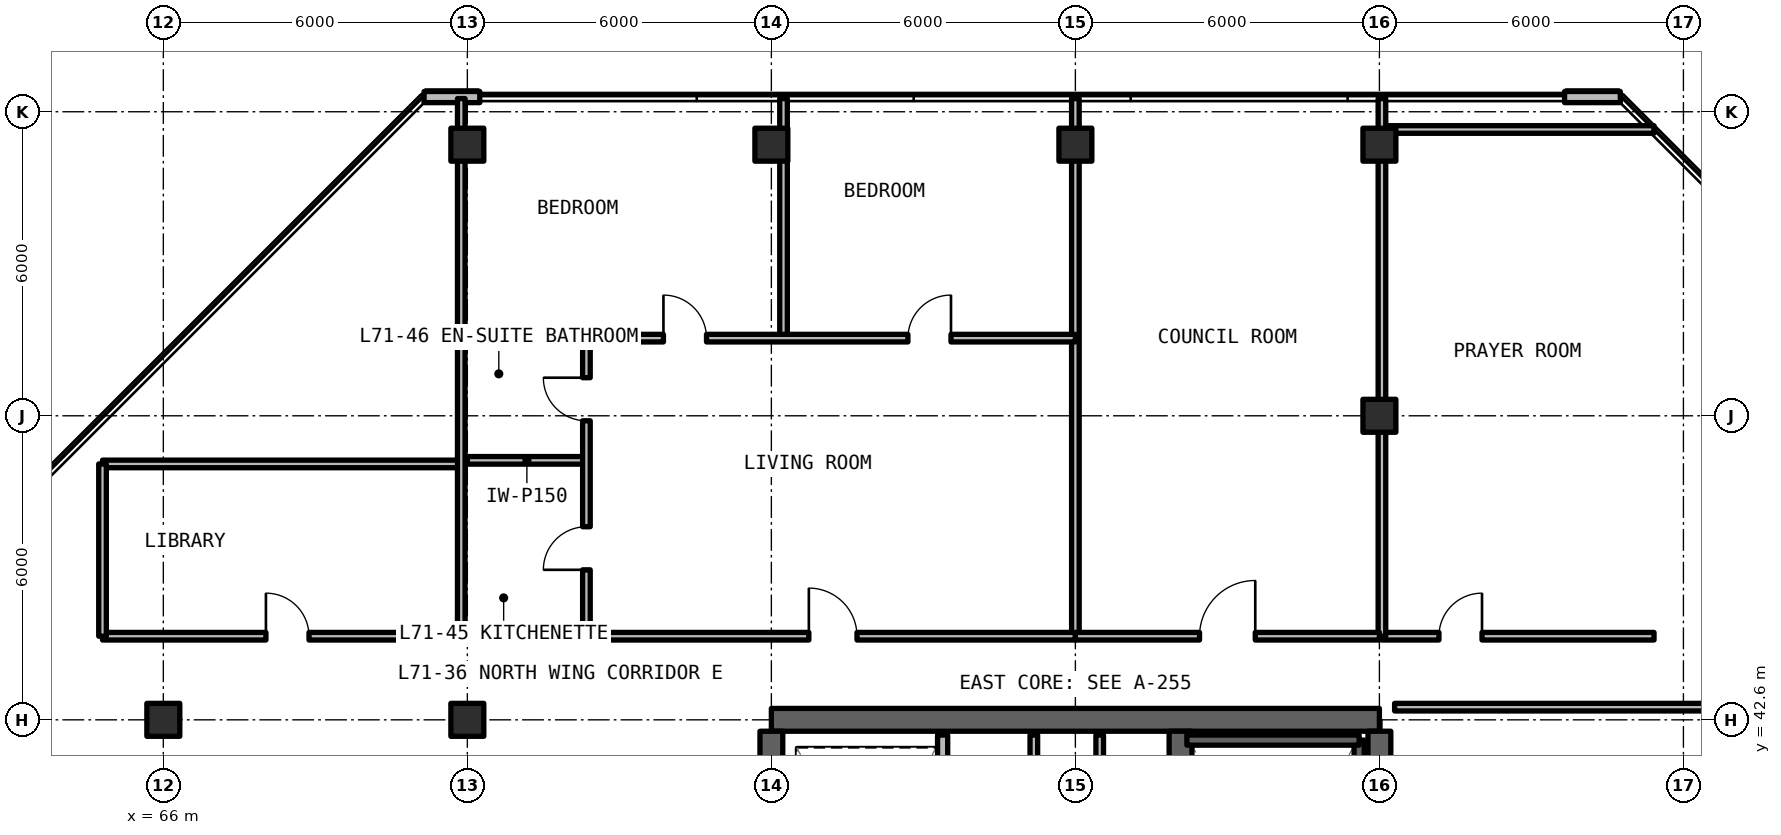
"""IFC4 building model, lengths in metres.
Left out: names, types, materials, properties, quantities, classifications, styles, units other than length and angle.
Written with IfcOpenShell. Run it as: python <this file> out.ifc"""

import sys

from ifc_helpers import new_model, si_unit, direction, frame, frame_2d, origin, origin_2d, place, context, subcontext, project, spatial, rectangle, extrude, element, fill, save


model = new_model("IFC4")
c1 = context("Model", 3, precision=1e-05, world=origin(), true_north=direction((0.0, 1.0)))
c2 = subcontext(c1, "Body", "Model", "MODEL_VIEW")
j1 = project(units=[si_unit("LENGTHUNIT", "METRE"), si_unit("PLANEANGLEUNIT", "RADIAN")], contexts=[c1])
p1 = place(None, origin())
s1 = spatial("IfcSite", under=j1, at=p1, CompositionType="ELEMENT")
p2 = place(p1, origin())
s2 = spatial("IfcBuilding", under=s1, at=p2, CompositionType="ELEMENT")
p3 = place(p2, frame((0.0, 0.0, 253.44)))
s3 = spatial("IfcBuildingStorey", under=s2, at=p3, CompositionType="ELEMENT", Elevation=253.44)
p4 = place(p3, frame((90.0, 42.6, 0.0), z_axis=(0.0, 0.0, 1.0), x_axis=(-1.0, 0.0, 0.0)))
e1 = element("IfcWall", 1, at=p4, inside=s3, PredefinedType="SHEAR", context=c2, shape_type="SweptSolid", body=[
    extrude(rectangle(XDim=12.0, YDim=0.45, at=frame_2d((6.0, 0.0))), origin(), (0.0, 0.0, 1.0), 3.63),
])
p5 = place(p3, frame((90.0, 24.825, 0.0), z_axis=(0.0, 0.0, 1.0), x_axis=(0.0, 1.0, 0.0)))
e2 = element("IfcWall", 2, at=p5, inside=s3, PredefinedType="SHEAR", context=c2, shape_type="SweptSolid", body=[
    extrude(rectangle(XDim=17.55, YDim=0.45, at=frame_2d((8.775, 0.0))), origin(), (0.0, 0.0, 1.0), 3.63),
])
p6 = place(p3, frame((78.0, 36.8, 0.0), z_axis=(0.0, 0.0, 1.0), x_axis=(0.0, 1.0, 0.0)))
e3 = element("IfcWall", 3, at=p6, inside=s3, PredefinedType="SHEAR", context=c2, shape_type="SweptSolid", body=[
    extrude(rectangle(XDim=5.575, YDim=0.45, at=frame_2d((2.788, 0.0))), origin(), (0.0, 0.0, 1.0), 3.63),
])
p7 = place(p3, frame((86.075, 24.825, 0.0), z_axis=(0.0, 0.0, 1.0), x_axis=(0.0, 1.0, 0.0)))
e4 = element("IfcWall", 4, at=p7, inside=s3, PredefinedType="SHEAR", context=c2, shape_type="SweptSolid", body=[
    extrude(rectangle(XDim=17.55, YDim=0.45, at=frame_2d((8.775, 0.0))), origin(), (0.0, 0.0, 1.0), 3.63),
])
p8 = place(p7, frame((0.425, 0.0, 0.0)))
e5 = element("IfcOpeningElement", 5, at=p8, cuts=e4, PredefinedType="OPENING", context=c2, shape_type="SweptSolid", body=[
    extrude(rectangle(XDim=1.15, YDim=2.15, at=frame_2d((0.575, 1.075))), frame((0.0, 0.235, 0.0), z_axis=(0.0, -1.0, 0.0), x_axis=(1.0, 0.0, 0.0)), (0.0, 0.0, 1.0), 0.47),
])
p9 = place(p7, frame((9.625, 0.0, 0.0)))
e6 = element("IfcOpeningElement", 6, at=p9, cuts=e4, PredefinedType="OPENING", context=c2, shape_type="SweptSolid", body=[
    extrude(rectangle(XDim=1.15, YDim=2.15, at=frame_2d((0.575, 1.075))), frame((0.0, 0.235, 0.0), z_axis=(0.0, -1.0, 0.0), x_axis=(1.0, 0.0, 0.0)), (0.0, 0.0, 1.0), 0.47),
])
for number, where, z_axis, x_axis in (
    (7, (66.0, 42.6, 0.0), (0.0, 0.0, 1.0), (1.0, 0.0, 0.0)),
    (8, (72.0, 42.6, 0.0), (0.0, 0.0, 1.0), (1.0, 0.0, 0.0)),
    (9, (90.0, 48.6, 0.0), (0.0, 0.0, 1.0), (1.0, 0.0, 0.0)),
    (10, (72.0, 53.95, 0.0), (0.0, 0.0, 1.0), (1.0, 0.0, 0.0)),
    (11, (78.0, 53.95, 0.0), (0.0, 0.0, 1.0), (1.0, 0.0, 0.0)),
    (12, (84.0, 53.95, 0.0), (0.0, 0.0, 1.0), (1.0, 0.0, 0.0)),
    (13, (90.0, 53.95, 0.0), (0.0, 0.0, 1.0), (1.0, 0.0, 0.0)),
):
    element("IfcColumn", number, at=place(p3, frame(where, z_axis=z_axis, x_axis=x_axis)), inside=s3, PredefinedType="COLUMN", context=c2, shape_type="SweptSolid", body=[
        extrude(rectangle(XDim=0.65, YDim=0.65, at=origin_2d()), origin(), (0.0, 0.0, 1.0), 3.63),
    ])
for number, where, z_axis, x_axis in (
    (14, (94.754, 54.89, 0.0), (0.0, 0.0, 1.0), (-1.0, 0.0, 0.0)),
    (15, (72.246, 54.89, 0.0), (0.0, 0.0, 1.0), (-1.0, 0.0, 0.0)),
):
    element("IfcWall", number, at=place(p3, frame(where, z_axis=z_axis, x_axis=x_axis)), inside=s3, PredefinedType="SOLIDWALL", context=c2, shape_type="SweptSolid", body=[
        extrude(rectangle(XDim=1.1, YDim=0.22, at=frame_2d((0.55, 0.0))), origin(), (0.0, 0.0, 1.0), 3.41),
    ])
p10 = place(p3, frame((84.48, 36.88, 0.0), z_axis=(0.0, 0.0, 1.0), x_axis=(0.0, 1.0, 0.0)))
e16 = element("IfcWall", 16, at=p10, inside=s3, PredefinedType="SOLIDWALL", context=c2, shape_type="SweptSolid", body=[
    extrude(rectangle(XDim=5.42, YDim=0.15, at=frame_2d((2.71, 0.0))), origin(), (0.0, 0.0, 1.0), 2.63),
])
p11 = place(p3, frame((83.18, 36.88, 0.0), z_axis=(0.0, 0.0, 1.0), x_axis=(0.0, 1.0, 0.0)))
e17 = element("IfcWall", 17, at=p11, inside=s3, PredefinedType="SOLIDWALL", context=c2, shape_type="SweptSolid", body=[
    extrude(rectangle(XDim=5.42, YDim=0.15, at=frame_2d((2.71, 0.0))), origin(), (0.0, 0.0, 1.0), 2.63),
])
p12 = place(p11, frame((2.1, 0.0, 0.0)))
e18 = element("IfcOpeningElement", 18, at=p12, cuts=e17, PredefinedType="OPENING", context=c2, shape_type="SweptSolid", body=[
    extrude(rectangle(XDim=0.95, YDim=2.15, at=frame_2d((0.475, 1.075))), frame((0.0, 0.085, 0.0), z_axis=(0.0, -1.0, 0.0), x_axis=(1.0, 0.0, 0.0)), (0.0, 0.0, 1.0), 0.17),
])
p13 = place(p3, frame((81.38, 36.88, 0.0), z_axis=(0.0, 0.0, 1.0), x_axis=(0.0, 1.0, 0.0)))
e19 = element("IfcWall", 19, at=p13, inside=s3, PredefinedType="SOLIDWALL", context=c2, shape_type="SweptSolid", body=[
    extrude(rectangle(XDim=5.42, YDim=0.2, at=frame_2d((2.71, 0.0))), origin(), (0.0, 0.0, 1.0), 2.63),
])
p14 = place(p13, frame((0.8, 0.0, 0.0)))
e20 = element("IfcOpeningElement", 20, at=p14, cuts=e19, PredefinedType="OPENING", context=c2, shape_type="SweptSolid", body=[
    extrude(rectangle(XDim=1.1, YDim=2.2, at=frame_2d((0.55, 1.1))), frame((0.0, 0.11, 0.0), z_axis=(0.0, -1.0, 0.0), x_axis=(1.0, 0.0, 0.0)), (0.0, 0.0, 1.0), 0.22),
])
p15 = place(p13, frame((3.3, 0.0, 0.0)))
e21 = element("IfcOpeningElement", 21, at=p15, cuts=e19, PredefinedType="OPENING", context=c2, shape_type="SweptSolid", body=[
    extrude(rectangle(XDim=1.1, YDim=2.2, at=frame_2d((0.55, 1.1))), frame((0.0, 0.11, 0.0), z_axis=(0.0, -1.0, 0.0), x_axis=(1.0, 0.0, 0.0)), (0.0, 0.0, 1.0), 0.22),
])
p16 = place(p3, frame((64.8, 44.25, 0.0), z_axis=(0.0, 0.0, 1.0), x_axis=(1.0, 0.0, 0.0)))
e22 = element("IfcWall", 22, at=p16, inside=s3, PredefinedType="SOLIDWALL", context=c2, shape_type="SweptSolid", body=[
    extrude(rectangle(XDim=7.08, YDim=0.15, at=frame_2d((3.54, 0.0))), origin(), (0.0, 0.0, 1.0), 2.63),
])
p17 = place(p16, frame((3.225, 0.0, 0.0)))
e23 = element("IfcOpeningElement", 23, at=p17, cuts=e22, PredefinedType="OPENING", context=c2, shape_type="SweptSolid", body=[
    extrude(rectangle(XDim=0.85, YDim=2.1, at=frame_2d((0.425, 1.05))), frame((0.0, 0.085, 0.0), z_axis=(0.0, -1.0, 0.0), x_axis=(1.0, 0.0, 0.0)), (0.0, 0.0, 1.0), 0.17),
])
p18 = place(p3, frame((64.8, 47.65, 0.0), z_axis=(0.0, 0.0, 1.0), x_axis=(1.0, 0.0, 0.0)))
e24 = element("IfcWall", 24, at=p18, inside=s3, PredefinedType="SOLIDWALL", context=c2, shape_type="SweptSolid", body=[
    extrude(rectangle(XDim=7.08, YDim=0.15, at=frame_2d((3.54, 0.0))), origin(), (0.0, 0.0, 1.0), 2.63),
])
p19 = place(p3, frame((64.8, 44.25, 0.0), z_axis=(0.0, 0.0, 1.0), x_axis=(0.0, 1.0, 0.0)))
e25 = element("IfcWall", 25, at=p19, inside=s3, PredefinedType="SOLIDWALL", context=c2, shape_type="SweptSolid", body=[
    extrude(rectangle(XDim=3.4, YDim=0.15, at=frame_2d((1.7, 0.0))), origin(), (0.0, 0.0, 1.0), 2.63),
])
p20 = place(p3, frame((71.88, 44.25, 0.0), z_axis=(0.0, 0.0, 1.0), x_axis=(0.0, 1.0, 0.0)))
e26 = element("IfcWall", 26, at=p20, inside=s3, PredefinedType="SOLIDWALL", context=c2, shape_type="SweptSolid", body=[
    extrude(rectangle(XDim=10.61, YDim=0.15, at=frame_2d((5.305, 0.0))), origin(), (0.0, 0.0, 1.0), 2.63),
])
p21 = place(p3, frame((90.3, 42.85, 0.0), z_axis=(0.0, 0.0, 1.0), x_axis=(1.0, 0.0, 0.0)))
e27 = element("IfcWall", 27, at=p21, inside=s3, PredefinedType="SOLIDWALL", context=c2, shape_type="SweptSolid", body=[
    extrude(rectangle(XDim=8.52, YDim=0.15, at=frame_2d((4.26, 0.0))), origin(), (0.0, 0.0, 1.0), 2.63),
])
p22 = place(p3, frame((90.05, 44.25, 0.0), z_axis=(0.0, 0.0, 1.0), x_axis=(1.0, 0.0, 0.0)))
e28 = element("IfcWall", 28, at=p22, inside=s3, PredefinedType="SOLIDWALL", context=c2, shape_type="SweptSolid", body=[
    extrude(rectangle(XDim=5.37, YDim=0.15, at=frame_2d((2.685, 0.0))), origin(), (0.0, 0.0, 1.0), 2.63),
])
p23 = place(p22, frame((1.125, 0.0, 0.0)))
e29 = element("IfcOpeningElement", 29, at=p23, cuts=e28, PredefinedType="OPENING", context=c2, shape_type="SweptSolid", body=[
    extrude(rectangle(XDim=0.85, YDim=2.1, at=frame_2d((0.425, 1.05))), frame((0.0, 0.085, 0.0), z_axis=(0.0, -1.0, 0.0), x_axis=(1.0, 0.0, 0.0)), (0.0, 0.0, 1.0), 0.17),
])
p24 = place(p3, frame((90.05, 54.25, 0.0), z_axis=(0.0, 0.0, 1.0), x_axis=(1.0, 0.0, 0.0)))
e30 = element("IfcWall", 30, at=p24, inside=s3, PredefinedType="SOLIDWALL", context=c2, shape_type="SweptSolid", body=[
    extrude(rectangle(XDim=5.37, YDim=0.15, at=frame_2d((2.685, 0.0))), origin(), (0.0, 0.0, 1.0), 2.63),
])
for number, where, z_axis, x_axis in (
    (31, (90.05, 44.25, 0.0), (0.0, 0.0, 1.0), (0.0, 1.0, 0.0)),
    (32, (84.0, 44.25, 0.0), (0.0, 0.0, 1.0), (0.0, 1.0, 0.0)),
):
    element("IfcWall", number, at=place(p3, frame(where, z_axis=z_axis, x_axis=x_axis)), inside=s3, PredefinedType="SOLIDWALL", context=c2, shape_type="SweptSolid", body=[
        extrude(rectangle(XDim=10.61, YDim=0.15, at=frame_2d((5.305, 0.0))), origin(), (0.0, 0.0, 1.0), 2.63),
    ])
p25 = place(p3, frame((72.0, 47.721, 0.0), z_axis=(0.0, 0.0, 1.0), x_axis=(1.0, 0.0, 0.0)))
e33 = element("IfcWall", 33, at=p25, inside=s3, PredefinedType="PARTITIONING", context=c2, shape_type="SweptSolid", body=[
    extrude(rectangle(XDim=2.35, YDim=0.15, at=frame_2d((1.175, 0.0))), origin(), (0.0, 0.0, 1.0), 2.63),
])
p26 = place(p3, frame((74.35, 44.25, 0.0), z_axis=(0.0, 0.0, 1.0), x_axis=(0.0, 1.0, 0.0)))
e34 = element("IfcWall", 34, at=p26, inside=s3, PredefinedType="PARTITIONING", context=c2, shape_type="SweptSolid", body=[
    extrude(rectangle(XDim=5.882, YDim=0.15, at=frame_2d((2.941, 0.0))), origin(), (0.0, 0.0, 1.0), 2.63),
])
p27 = place(p26, frame((1.31, 0.0, 0.0)))
e35 = element("IfcOpeningElement", 35, at=p27, cuts=e34, PredefinedType="OPENING", context=c2, shape_type="SweptSolid", body=[
    extrude(rectangle(XDim=0.85, YDim=2.1, at=frame_2d((0.425, 1.05))), frame((0.0, 0.085, 0.0), z_axis=(0.0, -1.0, 0.0), x_axis=(1.0, 0.0, 0.0)), (0.0, 0.0, 1.0), 0.17),
])
p28 = place(p26, frame((4.251, 0.0, 0.0)))
e36 = element("IfcOpeningElement", 36, at=p28, cuts=e34, PredefinedType="OPENING", context=c2, shape_type="SweptSolid", body=[
    extrude(rectangle(XDim=0.85, YDim=2.1, at=frame_2d((0.425, 1.05))), frame((0.0, 0.085, 0.0), z_axis=(0.0, -1.0, 0.0), x_axis=(1.0, 0.0, 0.0)), (0.0, 0.0, 1.0), 0.17),
])
p29 = place(p3, frame((78.24, 50.132, 0.0), z_axis=(0.0, 0.0, 1.0), x_axis=(0.0, 1.0, 0.0)))
e37 = element("IfcWall", 37, at=p29, inside=s3, PredefinedType="PARTITIONING", context=c2, shape_type="SweptSolid", body=[
    extrude(rectangle(XDim=4.728, YDim=0.15, at=frame_2d((2.364, 0.0))), origin(), (0.0, 0.0, 1.0), 2.63),
])
p30 = place(p3, frame((72.0, 50.132, 0.0), z_axis=(0.0, 0.0, 1.0), x_axis=(1.0, 0.0, 0.0)))
e38 = element("IfcWall", 38, at=p30, inside=s3, PredefinedType="PARTITIONING", context=c2, shape_type="SweptSolid", body=[
    extrude(rectangle(XDim=12.0, YDim=0.15, at=frame_2d((6.0, 0.0))), origin(), (0.0, 0.0, 1.0), 2.63),
])
p31 = place(p30, frame((3.87, 0.0, 0.0)))
e39 = element("IfcOpeningElement", 39, at=p31, cuts=e38, PredefinedType="OPENING", context=c2, shape_type="SweptSolid", body=[
    extrude(rectangle(XDim=0.85, YDim=2.1, at=frame_2d((0.425, 1.05))), frame((0.0, 0.085, 0.0), z_axis=(0.0, -1.0, 0.0), x_axis=(1.0, 0.0, 0.0)), (0.0, 0.0, 1.0), 0.17),
])
p32 = place(p30, frame((8.695, 0.0, 0.0)))
e40 = element("IfcOpeningElement", 40, at=p32, cuts=e38, PredefinedType="OPENING", context=c2, shape_type="SweptSolid", body=[
    extrude(rectangle(XDim=0.85, YDim=2.1, at=frame_2d((0.425, 1.05))), frame((0.0, 0.085, 0.0), z_axis=(0.0, -1.0, 0.0), x_axis=(1.0, 0.0, 0.0)), (0.0, 0.0, 1.0), 0.17),
])
p33 = place(p3, frame((72.0, 44.25, 0.0), z_axis=(0.0, 0.0, 1.0), x_axis=(1.0, 0.0, 0.0)))
e41 = element("IfcWall", 41, at=p33, inside=s3, PredefinedType="SOLIDWALL", context=c2, shape_type="SweptSolid", body=[
    extrude(rectangle(XDim=12.0, YDim=0.15, at=frame_2d((6.0, 0.0))), origin(), (0.0, 0.0, 1.0), 2.63),
])
p34 = place(p33, frame((6.74, 0.0, 0.0)))
e42 = element("IfcOpeningElement", 42, at=p34, cuts=e41, PredefinedType="OPENING", context=c2, shape_type="SweptSolid", body=[
    extrude(rectangle(XDim=0.95, YDim=2.15, at=frame_2d((0.475, 1.075))), frame((0.0, 0.085, 0.0), z_axis=(0.0, -1.0, 0.0), x_axis=(1.0, 0.0, 0.0)), (0.0, 0.0, 1.0), 0.17),
])
p35 = place(p3, frame((84.0, 44.25, 0.0), z_axis=(0.0, 0.0, 1.0), x_axis=(1.0, 0.0, 0.0)))
e43 = element("IfcWall", 43, at=p35, inside=s3, PredefinedType="SOLIDWALL", context=c2, shape_type="SweptSolid", body=[
    extrude(rectangle(XDim=6.0, YDim=0.15, at=frame_2d((3.0, 0.0))), origin(), (0.0, 0.0, 1.0), 2.63),
])
p36 = place(p35, frame((2.45, 0.0, 0.0)))
e44 = element("IfcOpeningElement", 44, at=p36, cuts=e43, PredefinedType="OPENING", context=c2, shape_type="SweptSolid", body=[
    extrude(rectangle(XDim=1.1, YDim=2.15, at=frame_2d((0.55, 1.075))), frame((0.0, 0.085, 0.0), z_axis=(0.0, -1.0, 0.0), x_axis=(1.0, 0.0, 0.0)), (0.0, 0.0, 1.0), 0.17),
])
p37 = place(p3, frame((89.6, 34.2, 0.0), z_axis=(0.0, 0.0, 1.0), x_axis=(0.0, 1.0, 0.0)))
e45 = element("IfcWall", 45, at=p37, inside=s3, PredefinedType="SOLIDWALL", context=c2, shape_type="SweptSolid", body=[
    extrude(rectangle(XDim=8.0, YDim=0.2, at=frame_2d((4.0, 0.0))), origin(), (0.0, 0.0, 1.0), 3.63),
])
p38 = place(p3, frame((89.6, 42.2, 0.0), z_axis=(0.0, 0.0, 1.0), x_axis=(-1.0, 0.0, 0.0)))
e46 = element("IfcWall", 46, at=p38, inside=s3, PredefinedType="SOLIDWALL", context=c2, shape_type="SweptSolid", body=[
    extrude(rectangle(XDim=3.4, YDim=0.2, at=frame_2d((1.7, 0.0))), origin(), (0.0, 0.0, 1.0), 3.63),
])
p39 = place(p17, origin())
e47 = element("IfcDoor", 47, at=p39, inside=s3, OperationType="SINGLE_SWING_LEFT", PredefinedType="DOOR", context=c2, shape_type="SweptSolid", body=[
    extrude(rectangle(XDim=0.85, YDim=2.1, at=frame_2d((0.425, 1.05))), frame((0.0, 0.025, 0.0), z_axis=(0.0, -1.0, 0.0), x_axis=(1.0, 0.0, 0.0)), (0.0, 0.0, 1.0), 0.05),
])
fill(e23, e47)
p40 = place(p23, origin())
e48 = element("IfcDoor", 48, at=p40, inside=s3, OperationType="SINGLE_SWING_RIGHT", PredefinedType="DOOR", context=c2, shape_type="SweptSolid", body=[
    extrude(rectangle(XDim=0.85, YDim=2.1, at=frame_2d((0.425, 1.05))), frame((0.0, 0.025, 0.0), z_axis=(0.0, -1.0, 0.0), x_axis=(1.0, 0.0, 0.0)), (0.0, 0.0, 1.0), 0.05),
])
fill(e29, e48)
p41 = place(p27, origin())
e49 = element("IfcDoor", 49, at=p41, inside=s3, OperationType="SINGLE_SWING_LEFT", PredefinedType="DOOR", context=c2, shape_type="SweptSolid", body=[
    extrude(rectangle(XDim=0.85, YDim=2.1, at=frame_2d((0.425, 1.05))), frame((0.0, 0.025, 0.0), z_axis=(0.0, -1.0, 0.0), x_axis=(1.0, 0.0, 0.0)), (0.0, 0.0, 1.0), 0.05),
])
fill(e35, e49)
p42 = place(p28, origin())
e50 = element("IfcDoor", 50, at=p42, inside=s3, OperationType="SINGLE_SWING_RIGHT", PredefinedType="DOOR", context=c2, shape_type="SweptSolid", body=[
    extrude(rectangle(XDim=0.85, YDim=2.1, at=frame_2d((0.425, 1.05))), frame((0.0, 0.025, 0.0), z_axis=(0.0, -1.0, 0.0), x_axis=(1.0, 0.0, 0.0)), (0.0, 0.0, 1.0), 0.05),
])
fill(e36, e50)
p43 = place(p31, origin())
e51 = element("IfcDoor", 51, at=p43, inside=s3, OperationType="SINGLE_SWING_LEFT", PredefinedType="DOOR", context=c2, shape_type="SweptSolid", body=[
    extrude(rectangle(XDim=0.85, YDim=2.1, at=frame_2d((0.425, 1.05))), frame((0.0, 0.025, 0.0), z_axis=(0.0, -1.0, 0.0), x_axis=(1.0, 0.0, 0.0)), (0.0, 0.0, 1.0), 0.05),
])
fill(e39, e51)
p44 = place(p32, origin())
e52 = element("IfcDoor", 52, at=p44, inside=s3, OperationType="SINGLE_SWING_RIGHT", PredefinedType="DOOR", context=c2, shape_type="SweptSolid", body=[
    extrude(rectangle(XDim=0.85, YDim=2.1, at=frame_2d((0.425, 1.05))), frame((0.0, 0.025, 0.0), z_axis=(0.0, -1.0, 0.0), x_axis=(1.0, 0.0, 0.0)), (0.0, 0.0, 1.0), 0.05),
])
fill(e40, e52)
p45 = place(p34, origin())
e53 = element("IfcDoor", 53, at=p45, inside=s3, OperationType="SINGLE_SWING_LEFT", PredefinedType="DOOR", context=c2, shape_type="SweptSolid", body=[
    extrude(rectangle(XDim=0.95, YDim=2.15, at=frame_2d((0.475, 1.075))), frame((0.0, 0.025, 0.0), z_axis=(0.0, -1.0, 0.0), x_axis=(1.0, 0.0, 0.0)), (0.0, 0.0, 1.0), 0.05),
])
fill(e42, e53)
p46 = place(p36, origin())
e54 = element("IfcDoor", 54, at=p46, inside=s3, OperationType="SINGLE_SWING_RIGHT", PredefinedType="DOOR", context=c2, shape_type="SweptSolid", body=[
    extrude(rectangle(XDim=1.1, YDim=2.15, at=frame_2d((0.55, 1.075))), frame((0.0, 0.025, 0.0), z_axis=(0.0, -1.0, 0.0), x_axis=(1.0, 0.0, 0.0)), (0.0, 0.0, 1.0), 0.05),
])
fill(e44, e54)
save(model, sys.argv[1])
